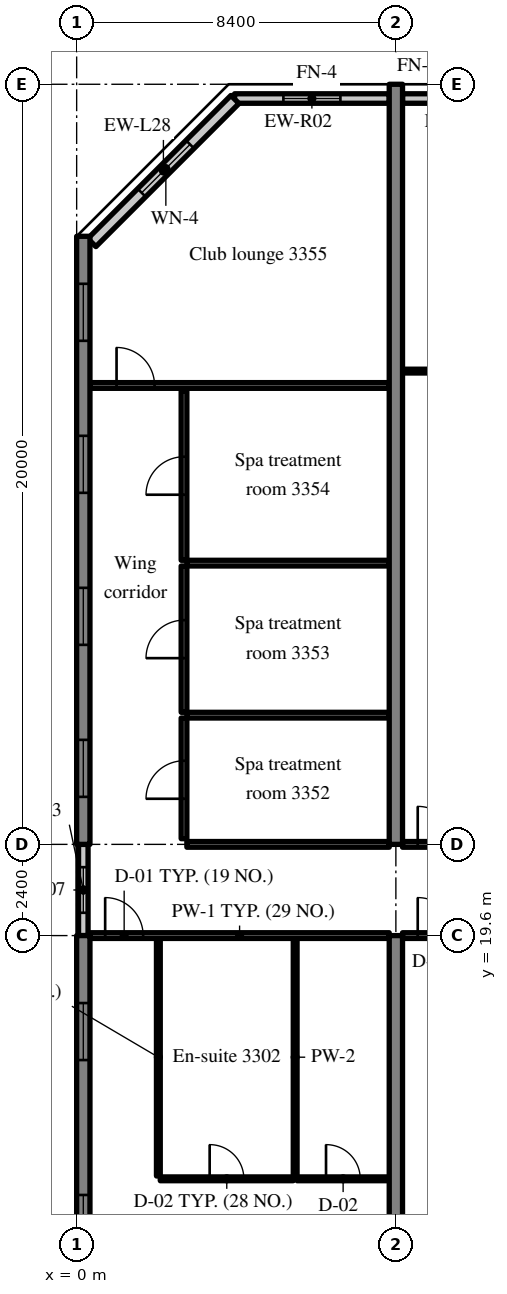
"""IFC4 building model, lengths in metres.
Left out: names, types, materials, properties, quantities, classifications, styles, units other than length and angle.
Written with IfcOpenShell. Run it as: python <this file> out.ifc"""

import sys

from ifc_helpers import new_model, si_unit, direction, frame, frame_2d, origin, place, context, subcontext, project, spatial, rectangle, extrude, source, transform, mapped, element, fill, save


model = new_model("IFC4")
c1 = context("Model", 3, precision=1e-05, world=origin(), true_north=direction((0.0, 1.0)))
c2 = subcontext(c1, "Body", "Model", "MODEL_VIEW")
j1 = project(units=[si_unit("LENGTHUNIT", "METRE"), si_unit("PLANEANGLEUNIT", "RADIAN")], contexts=[c1])
p1 = place(None, origin())
s1 = spatial("IfcSite", under=j1, at=p1, CompositionType="ELEMENT")
p2 = place(p1, origin())
s2 = spatial("IfcBuilding", under=s1, at=p2, CompositionType="ELEMENT")
p3 = place(p2, frame((0.0, 0.0, 137.0)))
s3 = spatial("IfcBuildingStorey", under=s2, at=p3, CompositionType="ELEMENT", Elevation=137.0)
m1 = source(origin(), c2, "Body", "SweptSolid", [
    extrude(rectangle(XDim=10.1, YDim=0.35, at=frame_2d((5.05, 0.0))), origin(), (0.0, 0.0, 1.0), 3.52),
])
p4 = place(p3, frame((0.175, 9.5, 0.0), z_axis=(0.0, 0.0, 1.0), x_axis=(0.0, 1.0, 0.0)))
e1 = element("IfcWall", 1, at=p4, inside=s3, PredefinedType="SHEAR", context=c2, shape_type="MappedRepresentation", body=[
    mapped(m1, transform((0.0, 0.0, 0.0), scale=1.0)),
])
m2 = source(origin(), c2, "Body", "SweptSolid", [
    extrude(rectangle(XDim=1.5, YDim=1.5, at=frame_2d((0.75, 0.75))), frame((0.0, 0.185, 0.0), z_axis=(0.0, -1.0, 0.0), x_axis=(1.0, 0.0, 0.0)), (0.0, 0.0, 1.0), 0.37),
])
p5 = place(p4, frame((1.775, 0.0, 0.9)))
e2 = element("IfcOpeningElement", 2, at=p5, cuts=e1, PredefinedType="OPENING", context=c2, shape_type="MappedRepresentation", body=[
    mapped(m2, transform((0.0, 0.0, 0.0), scale=1.0)),
])
p6 = place(p4, frame((6.825, 0.0, 0.9)))
e3 = element("IfcOpeningElement", 3, at=p6, cuts=e1, PredefinedType="OPENING", context=c2, shape_type="MappedRepresentation", body=[
    mapped(m2, transform((0.0, 0.0, 0.0), scale=1.0)),
])
m3 = source(origin(), c2, "Body", "SweptSolid", [
    extrude(rectangle(XDim=16.0, YDim=0.35, at=frame_2d((8.0, 0.0))), origin(), (0.0, 0.0, 1.0), 3.52),
])
p7 = place(p3, frame((0.175, 22.0, 0.0), z_axis=(0.0, 0.0, 1.0), x_axis=(0.0, 1.0, 0.0)))
e4 = element("IfcWall", 4, at=p7, inside=s3, PredefinedType="SHEAR", context=c2, shape_type="MappedRepresentation", body=[
    mapped(m3, transform((0.0, 0.0, 0.0), scale=1.0)),
])
p8 = place(p7, frame((1.25, 0.0, 0.9)))
e5 = element("IfcOpeningElement", 5, at=p8, cuts=e4, PredefinedType="OPENING", context=c2, shape_type="MappedRepresentation", body=[
    mapped(m2, transform((0.0, 0.0, 0.0), scale=1.0)),
])
p9 = place(p7, frame((5.25, 0.0, 0.9)))
e6 = element("IfcOpeningElement", 6, at=p9, cuts=e4, PredefinedType="OPENING", context=c2, shape_type="MappedRepresentation", body=[
    mapped(m2, transform((0.0, 0.0, 0.0), scale=1.0)),
])
p10 = place(p7, frame((9.25, 0.0, 0.9)))
e7 = element("IfcOpeningElement", 7, at=p10, cuts=e4, PredefinedType="OPENING", context=c2, shape_type="MappedRepresentation", body=[
    mapped(m2, transform((0.0, 0.0, 0.0), scale=1.0)),
])
p11 = place(p7, frame((13.25, 0.0, 0.9)))
e8 = element("IfcOpeningElement", 8, at=p11, cuts=e4, PredefinedType="OPENING", context=c2, shape_type="MappedRepresentation", body=[
    mapped(m2, transform((0.0, 0.0, 0.0), scale=1.0)),
])
m4 = source(origin(), c2, "Body", "SweptSolid", [
    extrude(rectangle(XDim=14.1, YDim=0.35, at=frame_2d((7.05, 0.0))), origin(), (0.0, 0.0, 1.0), 3.52),
])
p12 = place(p3, frame((8.4, 5.5, 0.0), z_axis=(0.0, 0.0, 1.0), x_axis=(0.0, 1.0, 0.0)))
e9 = element("IfcWall", 9, at=p12, inside=s3, PredefinedType="SHEAR", context=c2, shape_type="MappedRepresentation", body=[
    mapped(m4, transform((0.0, 0.0, 0.0), scale=1.0)),
])
m5 = source(origin(), c2, "Body", "SweptSolid", [
    extrude(rectangle(XDim=20.0, YDim=0.35, at=frame_2d((10.0, 0.0))), origin(), (0.0, 0.0, 1.0), 3.52),
])
p13 = place(p3, frame((8.4, 22.0, 0.0), z_axis=(0.0, 0.0, 1.0), x_axis=(0.0, 1.0, 0.0)))
e10 = element("IfcWall", 10, at=p13, inside=s3, PredefinedType="SHEAR", context=c2, shape_type="MappedRepresentation", body=[
    mapped(m5, transform((0.0, 0.0, 0.0), scale=1.0)),
])
m6 = source(origin(), c2, "Body", "SweptSolid", [
    extrude(rectangle(XDim=4.07, YDim=0.25, at=frame_2d((2.035, 0.0))), origin(), (0.0, 0.0, 1.0), 2.82),
])
p14 = place(p3, frame((8.225, 41.625, 0.0), z_axis=(0.0, 0.0, 1.0), x_axis=(-1.0, 0.0, 0.0)))
e11 = element("IfcWall", 11, at=p14, inside=s3, PredefinedType="SOLIDWALL", context=c2, shape_type="MappedRepresentation", body=[
    mapped(m6, transform((0.0, 0.0, 0.0), scale=1.0)),
])
m7 = source(origin(), c2, "Body", "SweptSolid", [
    extrude(rectangle(XDim=1.5, YDim=1.5, at=frame_2d((0.75, 0.75))), frame((0.0, 0.135, 0.0), z_axis=(0.0, -1.0, 0.0), x_axis=(1.0, 0.0, 0.0)), (0.0, 0.0, 1.0), 0.27),
])
p15 = place(p14, frame((1.285, 0.0, 0.9)))
e12 = element("IfcOpeningElement", 12, at=p15, cuts=e11, PredefinedType="OPENING", context=c2, shape_type="MappedRepresentation", body=[
    mapped(m7, transform((0.0, 0.0, 0.0), scale=1.0)),
])
m8 = source(origin(), c2, "Body", "SweptSolid", [
    extrude(rectangle(XDim=3.675, YDim=0.25, at=frame_2d((1.837, 0.0))), origin(), (0.0, 0.0, 1.0), 2.82),
])
p16 = place(p3, frame((12.25, 41.625, 0.0), z_axis=(0.0, 0.0, 1.0), x_axis=(-1.0, 0.0, 0.0)))
e13 = element("IfcWall", 13, at=p16, inside=s3, PredefinedType="SOLIDWALL", context=c2, shape_type="MappedRepresentation", body=[
    mapped(m8, transform((0.0, 0.0, 0.0), scale=1.0)),
])
p17 = place(p16, frame((1.087, 0.0, 0.9)))
e14 = element("IfcOpeningElement", 14, at=p17, cuts=e13, PredefinedType="OPENING", context=c2, shape_type="MappedRepresentation", body=[
    mapped(m7, transform((0.0, 0.0, 0.0), scale=1.0)),
])
m9 = source(origin(), c2, "Body", "SweptSolid", [
    extrude(rectangle(XDim=5.326, YDim=0.3, at=frame_2d((2.663, 0.0))), origin(), (0.0, 0.0, 1.0), 3.52),
])
p18 = place(p3, frame((4.166, 41.6, 0.0), z_axis=(0.0, 0.0, 1.0), x_axis=(-0.707106781187, -0.707106781187, 0.0)))
e15 = element("IfcWall", 15, at=p18, inside=s3, PredefinedType="SOLIDWALL", context=c2, shape_type="MappedRepresentation", body=[
    mapped(m9, transform((0.0, 0.0, 0.0), scale=1.0)),
])
m10 = source(origin(), c2, "Body", "SweptSolid", [
    extrude(rectangle(XDim=1.8, YDim=1.5, at=frame_2d((0.9, 0.75))), frame((0.0, 0.16, 0.0), z_axis=(0.0, -1.0, 0.0), x_axis=(1.0, 0.0, 0.0)), (0.0, 0.0, 1.0), 0.32),
])
p19 = place(p18, frame((1.672, 0.0, 0.9)))
e16 = element("IfcOpeningElement", 16, at=p19, cuts=e15, PredefinedType="OPENING", context=c2, shape_type="MappedRepresentation", body=[
    mapped(m10, transform((0.0, 0.0, 0.0), scale=1.0)),
])
m11 = source(origin(), c2, "Body", "SweptSolid", [
    extrude(rectangle(XDim=2.4, YDim=0.25, at=frame_2d((1.2, 0.0))), origin(), (0.0, 0.0, 1.0), 2.62),
])
p20 = place(p3, frame((0.175, 19.6, 0.0), z_axis=(0.0, 0.0, 1.0), x_axis=(0.0, 1.0, 0.0)))
e17 = element("IfcWall", 17, at=p20, inside=s3, PredefinedType="SOLIDWALL", context=c2, shape_type="MappedRepresentation", body=[
    mapped(m11, transform((0.0, 0.0, 0.0), scale=1.0)),
])
m12 = source(origin(), c2, "Body", "SweptSolid", [
    extrude(rectangle(XDim=1.2, YDim=1.5, at=frame_2d((0.6, 0.75))), frame((0.0, 0.135, 0.0), z_axis=(0.0, -1.0, 0.0), x_axis=(1.0, 0.0, 0.0)), (0.0, 0.0, 1.0), 0.27),
])
p21 = place(p20, frame((0.6, 0.0, 0.9)))
e18 = element("IfcOpeningElement", 18, at=p21, cuts=e17, PredefinedType="OPENING", context=c2, shape_type="MappedRepresentation", body=[
    mapped(m12, transform((0.0, 0.0, 0.0), scale=1.0)),
])
m13 = source(origin(), c2, "Body", "SweptSolid", [
    extrude(rectangle(XDim=6.25, YDim=0.1, at=frame_2d((3.125, 0.0))), origin(), (0.0, 0.0, 1.0), 3.52),
])
for number, where, z_axis, x_axis in (
    (19, (2.15, 13.275, 0.0), (0.0, 0.0, 1.0), (0.0, 1.0, 0.0)),
    (20, (5.75, 13.275, 0.0), (0.0, 0.0, 1.0), (0.0, 1.0, 0.0)),
):
    element("IfcWall", number, at=place(p3, frame(where, z_axis=z_axis, x_axis=x_axis)), inside=s3, PredefinedType="PARTITIONING", context=c2, shape_type="MappedRepresentation", body=[
        mapped(m13, transform((0.0, 0.0, 0.0), scale=1.0)),
    ])
m14 = source(origin(), c2, "Body", "SweptSolid", [
    extrude(rectangle(XDim=3.5, YDim=0.1, at=frame_2d((1.75, 0.0))), origin(), (0.0, 0.0, 1.0), 3.52),
])
p22 = place(p3, frame((2.2, 13.2, 0.0), z_axis=(0.0, 0.0, 1.0), x_axis=(1.0, 0.0, 0.0)))
e21 = element("IfcWall", 21, at=p22, inside=s3, PredefinedType="PARTITIONING", context=c2, shape_type="MappedRepresentation", body=[
    mapped(m14, transform((0.0, 0.0, 0.0), scale=1.0)),
])
m15 = source(origin(), c2, "Body", "SweptSolid", [
    extrude(rectangle(XDim=0.9, YDim=2.1, at=frame_2d((0.45, 1.05))), frame((0.0, 0.06, 0.0), z_axis=(0.0, -1.0, 0.0), x_axis=(1.0, 0.0, 0.0)), (0.0, 0.0, 1.0), 0.12),
])
p23 = place(p22, frame((1.3, 0.0, 0.0)))
e22 = element("IfcOpeningElement", 22, at=p23, cuts=e21, PredefinedType="OPENING", context=c2, shape_type="MappedRepresentation", body=[
    mapped(m15, transform((0.0, 0.0, 0.0), scale=1.0)),
])
m16 = source(origin(), c2, "Body", "SweptSolid", [
    extrude(rectangle(XDim=2.425, YDim=0.1, at=frame_2d((1.212, 0.0))), origin(), (0.0, 0.0, 1.0), 3.52),
])
p24 = place(p3, frame((5.8, 13.2, 0.0), z_axis=(0.0, 0.0, 1.0), x_axis=(1.0, 0.0, 0.0)))
e23 = element("IfcWall", 23, at=p24, inside=s3, PredefinedType="PARTITIONING", context=c2, shape_type="MappedRepresentation", body=[
    mapped(m16, transform((0.0, 0.0, 0.0), scale=1.0)),
])
p25 = place(p24, frame((0.762, 0.0, 0.0)))
e24 = element("IfcOpeningElement", 24, at=p25, cuts=e23, PredefinedType="OPENING", context=c2, shape_type="MappedRepresentation", body=[
    mapped(m15, transform((0.0, 0.0, 0.0), scale=1.0)),
])
m17 = source(origin(), c2, "Body", "SweptSolid", [
    extrude(rectangle(XDim=7.875, YDim=0.15, at=frame_2d((3.938, 0.0))), origin(), (0.0, 0.0, 1.0), 2.82),
])
p26 = place(p3, frame((0.35, 19.6, 0.0), z_axis=(0.0, 0.0, 1.0), x_axis=(1.0, 0.0, 0.0)))
e25 = element("IfcWall", 25, at=p26, inside=s3, PredefinedType="PARTITIONING", context=c2, shape_type="MappedRepresentation", body=[
    mapped(m17, transform((0.0, 0.0, 0.0), scale=1.0)),
])
m18 = source(origin(), c2, "Body", "SweptSolid", [
    extrude(rectangle(XDim=1.0, YDim=2.1, at=frame_2d((0.5, 1.05))), frame((0.0, 0.085, 0.0), z_axis=(0.0, -1.0, 0.0), x_axis=(1.0, 0.0, 0.0)), (0.0, 0.0, 1.0), 0.17),
])
p27 = place(p26, frame((0.4, 0.0, 0.0)))
e26 = element("IfcOpeningElement", 26, at=p27, cuts=e25, PredefinedType="OPENING", context=c2, shape_type="MappedRepresentation", body=[
    mapped(m18, transform((0.0, 0.0, 0.0), scale=1.0)),
])
m19 = source(origin(), c2, "Body", "SweptSolid", [
    extrude(rectangle(XDim=8.05, YDim=0.15, at=frame_2d((4.025, 0.0))), origin(), (0.0, 0.0, 1.0), 2.82),
])
p28 = place(p3, frame((8.575, 19.6, 0.0), z_axis=(0.0, 0.0, 1.0), x_axis=(1.0, 0.0, 0.0)))
e27 = element("IfcWall", 27, at=p28, inside=s3, PredefinedType="PARTITIONING", context=c2, shape_type="MappedRepresentation", body=[
    mapped(m19, transform((0.0, 0.0, 0.0), scale=1.0)),
])
p29 = place(p28, frame((0.4, 0.0, 0.0)))
e28 = element("IfcOpeningElement", 28, at=p29, cuts=e27, PredefinedType="OPENING", context=c2, shape_type="MappedRepresentation", body=[
    mapped(m18, transform((0.0, 0.0, 0.0), scale=1.0)),
])
m20 = source(origin(), c2, "Body", "SweptSolid", [
    extrude(rectangle(XDim=5.325, YDim=0.15, at=frame_2d((2.663, 0.0))), origin(), (0.0, 0.0, 1.0), 2.82),
])
p30 = place(p3, frame((2.9, 22.0, 0.0), z_axis=(0.0, 0.0, 1.0), x_axis=(1.0, 0.0, 0.0)))
e29 = element("IfcWall", 29, at=p30, inside=s3, PredefinedType="PARTITIONING", context=c2, shape_type="MappedRepresentation", body=[
    mapped(m20, transform((0.0, 0.0, 0.0), scale=1.0)),
])
m21 = source(origin(), c2, "Body", "SweptSolid", [
    extrude(rectangle(XDim=3.175, YDim=0.15, at=frame_2d((1.587, 0.0))), origin(), (0.0, 0.0, 1.0), 3.52),
])
p31 = place(p3, frame((2.825, 22.15, 0.0), z_axis=(0.0, 0.0, 1.0), x_axis=(0.0, 1.0, 0.0)))
e30 = element("IfcWall", 30, at=p31, inside=s3, PredefinedType="PARTITIONING", context=c2, shape_type="MappedRepresentation", body=[
    mapped(m21, transform((0.0, 0.0, 0.0), scale=1.0)),
])
p32 = place(p31, frame((1.05, 0.0, 0.0)))
e31 = element("IfcOpeningElement", 31, at=p32, cuts=e30, PredefinedType="OPENING", context=c2, shape_type="MappedRepresentation", body=[
    mapped(m18, transform((0.0, 0.0, 0.0), scale=1.0)),
])
m22 = source(origin(), c2, "Body", "SweptSolid", [
    extrude(rectangle(XDim=5.325, YDim=0.15, at=frame_2d((2.663, 0.0))), origin(), (0.0, 0.0, 1.0), 3.52),
])
p33 = place(p3, frame((2.9, 25.4, 0.0), z_axis=(0.0, 0.0, 1.0), x_axis=(1.0, 0.0, 0.0)))
e32 = element("IfcWall", 32, at=p33, inside=s3, PredefinedType="PARTITIONING", context=c2, shape_type="MappedRepresentation", body=[
    mapped(m22, transform((0.0, 0.0, 0.0), scale=1.0)),
])
m23 = source(origin(), c2, "Body", "SweptSolid", [
    extrude(rectangle(XDim=3.85, YDim=0.15, at=frame_2d((1.925, 0.0))), origin(), (0.0, 0.0, 1.0), 3.52),
])
p34 = place(p3, frame((2.825, 25.475, 0.0), z_axis=(0.0, 0.0, 1.0), x_axis=(0.0, 1.0, 0.0)))
e33 = element("IfcWall", 33, at=p34, inside=s3, PredefinedType="PARTITIONING", context=c2, shape_type="MappedRepresentation", body=[
    mapped(m23, transform((0.0, 0.0, 0.0), scale=1.0)),
])
p35 = place(p34, frame((1.425, 0.0, 0.0)))
e34 = element("IfcOpeningElement", 34, at=p35, cuts=e33, PredefinedType="OPENING", context=c2, shape_type="MappedRepresentation", body=[
    mapped(m18, transform((0.0, 0.0, 0.0), scale=1.0)),
])
p36 = place(p3, frame((2.9, 29.4, 0.0), z_axis=(0.0, 0.0, 1.0), x_axis=(1.0, 0.0, 0.0)))
e35 = element("IfcWall", 35, at=p36, inside=s3, PredefinedType="PARTITIONING", context=c2, shape_type="MappedRepresentation", body=[
    mapped(m22, transform((0.0, 0.0, 0.0), scale=1.0)),
])
m24 = source(origin(), c2, "Body", "SweptSolid", [
    extrude(rectangle(XDim=4.45, YDim=0.15, at=frame_2d((2.225, 0.0))), origin(), (0.0, 0.0, 1.0), 3.52),
])
p37 = place(p3, frame((2.825, 29.475, 0.0), z_axis=(0.0, 0.0, 1.0), x_axis=(0.0, 1.0, 0.0)))
e36 = element("IfcWall", 36, at=p37, inside=s3, PredefinedType="PARTITIONING", context=c2, shape_type="MappedRepresentation", body=[
    mapped(m24, transform((0.0, 0.0, 0.0), scale=1.0)),
])
p38 = place(p37, frame((1.725, 0.0, 0.0)))
e37 = element("IfcOpeningElement", 37, at=p38, cuts=e36, PredefinedType="OPENING", context=c2, shape_type="MappedRepresentation", body=[
    mapped(m18, transform((0.0, 0.0, 0.0), scale=1.0)),
])
m25 = source(origin(), c2, "Body", "SweptSolid", [
    extrude(rectangle(XDim=7.875, YDim=0.15, at=frame_2d((3.938, 0.0))), origin(), (0.0, 0.0, 1.0), 3.52),
])
p39 = place(p3, frame((0.35, 34.075, 0.0), z_axis=(0.0, 0.0, 1.0), x_axis=(1.0, 0.0, 0.0)))
e38 = element("IfcWall", 38, at=p39, inside=s3, PredefinedType="PARTITIONING", context=c2, shape_type="MappedRepresentation", body=[
    mapped(m25, transform((0.0, 0.0, 0.0), scale=1.0)),
])
p40 = place(p39, frame((0.7, 0.0, 0.0)))
e39 = element("IfcOpeningElement", 39, at=p40, cuts=e38, PredefinedType="OPENING", context=c2, shape_type="MappedRepresentation", body=[
    mapped(m18, transform((0.0, 0.0, 0.0), scale=1.0)),
])
m26 = source(origin(), c2, "Body", "SweptSolid", [
    extrude(rectangle(XDim=8.05, YDim=0.1, at=frame_2d((4.025, 0.0))), origin(), (0.0, 0.0, 1.0), 3.52),
])
p41 = place(p3, frame((8.575, 34.453, 0.0), z_axis=(0.0, 0.0, 1.0), x_axis=(1.0, 0.0, 0.0)))
e40 = element("IfcWall", 40, at=p41, inside=s3, PredefinedType="PARTITIONING", context=c2, shape_type="MappedRepresentation", body=[
    mapped(m26, transform((0.0, 0.0, 0.0), scale=1.0)),
])
m27 = source(origin(), c2, "Body", "SweptSolid", [
    extrude(rectangle(XDim=1.8, YDim=2.1, at=frame_2d((0.9, 1.05))), frame((0.0, 0.06, 0.0), z_axis=(0.0, -1.0, 0.0), x_axis=(1.0, 0.0, 0.0)), (0.0, 0.0, 1.0), 0.12),
])
p42 = place(p41, frame((3.125, 0.0, 0.0)))
e41 = element("IfcOpeningElement", 41, at=p42, cuts=e40, PredefinedType="OPENING", context=c2, shape_type="MappedRepresentation", body=[
    mapped(m27, transform((0.0, 0.0, 0.0), scale=1.0)),
])
p43 = place(p3, frame((8.575, 22.0, 0.0), z_axis=(0.0, 0.0, 1.0), x_axis=(1.0, 0.0, 0.0)))
e42 = element("IfcWall", 42, at=p43, inside=s3, PredefinedType="PARTITIONING", context=c2, shape_type="MappedRepresentation", body=[
    mapped(m19, transform((0.0, 0.0, 0.0), scale=1.0)),
])
p44 = place(p43, frame((0.4, 0.0, 0.0)))
e43 = element("IfcOpeningElement", 43, at=p44, cuts=e42, PredefinedType="OPENING", context=c2, shape_type="MappedRepresentation", body=[
    mapped(m18, transform((0.0, 0.0, 0.0), scale=1.0)),
])
m28 = source(origin(), c2, "Body", "SweptSolid", [
    extrude(rectangle(XDim=1.5, YDim=1.5, at=frame_2d((0.75, 0.75))), frame((0.0, 0.03, 0.0), z_axis=(0.0, -1.0, 0.0), x_axis=(1.0, 0.0, 0.0)), (0.0, 0.0, 1.0), 0.06),
])
p45 = place(p15, origin())
e44 = element("IfcWindow", 44, at=p45, inside=s3, PartitioningType="SINGLE_PANEL", PredefinedType="WINDOW", context=c2, shape_type="MappedRepresentation", body=[
    mapped(m28, transform((0.0, 0.0, 0.0), scale=1.0)),
])
fill(e12, e44)
m29 = source(origin(), c2, "Body", "SweptSolid", [
    extrude(rectangle(XDim=1.8, YDim=1.5, at=frame_2d((0.9, 0.75))), frame((0.0, 0.03, 0.0), z_axis=(0.0, -1.0, 0.0), x_axis=(1.0, 0.0, 0.0)), (0.0, 0.0, 1.0), 0.06),
])
p46 = place(p19, origin())
e45 = element("IfcWindow", 45, at=p46, inside=s3, PartitioningType="SINGLE_PANEL", PredefinedType="WINDOW", context=c2, shape_type="MappedRepresentation", body=[
    mapped(m29, transform((0.0, 0.0, 0.0), scale=1.0)),
])
fill(e16, e45)
p47 = place(p5, origin())
e46 = element("IfcWindow", 46, at=p47, inside=s3, PartitioningType="SINGLE_PANEL", PredefinedType="WINDOW", context=c2, shape_type="MappedRepresentation", body=[
    mapped(m28, transform((0.0, 0.0, 0.0), scale=1.0)),
])
fill(e2, e46)
p48 = place(p6, origin())
e47 = element("IfcWindow", 47, at=p48, inside=s3, PartitioningType="SINGLE_PANEL", PredefinedType="WINDOW", context=c2, shape_type="MappedRepresentation", body=[
    mapped(m28, transform((0.0, 0.0, 0.0), scale=1.0)),
])
fill(e3, e47)
p49 = place(p8, origin())
e48 = element("IfcWindow", 48, at=p49, inside=s3, PartitioningType="SINGLE_PANEL", PredefinedType="WINDOW", context=c2, shape_type="MappedRepresentation", body=[
    mapped(m28, transform((0.0, 0.0, 0.0), scale=1.0)),
])
fill(e5, e48)
p50 = place(p9, origin())
e49 = element("IfcWindow", 49, at=p50, inside=s3, PartitioningType="SINGLE_PANEL", PredefinedType="WINDOW", context=c2, shape_type="MappedRepresentation", body=[
    mapped(m28, transform((0.0, 0.0, 0.0), scale=1.0)),
])
fill(e6, e49)
p51 = place(p10, origin())
e50 = element("IfcWindow", 50, at=p51, inside=s3, PartitioningType="SINGLE_PANEL", PredefinedType="WINDOW", context=c2, shape_type="MappedRepresentation", body=[
    mapped(m28, transform((0.0, 0.0, 0.0), scale=1.0)),
])
fill(e7, e50)
p52 = place(p11, origin())
e51 = element("IfcWindow", 51, at=p52, inside=s3, PartitioningType="SINGLE_PANEL", PredefinedType="WINDOW", context=c2, shape_type="MappedRepresentation", body=[
    mapped(m28, transform((0.0, 0.0, 0.0), scale=1.0)),
])
fill(e8, e51)
m30 = source(origin(), c2, "Body", "SweptSolid", [
    extrude(rectangle(XDim=1.2, YDim=1.5, at=frame_2d((0.6, 0.75))), frame((0.0, 0.03, 0.0), z_axis=(0.0, -1.0, 0.0), x_axis=(1.0, 0.0, 0.0)), (0.0, 0.0, 1.0), 0.06),
])
p53 = place(p21, origin())
e52 = element("IfcWindow", 52, at=p53, inside=s3, PartitioningType="SINGLE_PANEL", PredefinedType="WINDOW", context=c2, shape_type="MappedRepresentation", body=[
    mapped(m30, transform((0.0, 0.0, 0.0), scale=1.0)),
])
fill(e18, e52)
m31 = source(origin(), c2, "Body", "SweptSolid", [
    extrude(rectangle(XDim=0.9, YDim=2.1, at=frame_2d((0.45, 1.05))), frame((0.0, 0.025, 0.0), z_axis=(0.0, -1.0, 0.0), x_axis=(1.0, 0.0, 0.0)), (0.0, 0.0, 1.0), 0.05),
])
p54 = place(p23, origin())
e53 = element("IfcDoor", 53, at=p54, inside=s3, OperationType="SINGLE_SWING_LEFT", PredefinedType="DOOR", context=c2, shape_type="MappedRepresentation", body=[
    mapped(m31, transform((0.0, 0.0, 0.0), scale=1.0)),
])
fill(e22, e53)
p55 = place(p25, origin())
e54 = element("IfcDoor", 54, at=p55, inside=s3, OperationType="SINGLE_SWING_LEFT", PredefinedType="DOOR", context=c2, shape_type="MappedRepresentation", body=[
    mapped(m31, transform((0.0, 0.0, 0.0), scale=1.0)),
])
fill(e24, e54)
m32 = source(origin(), c2, "Body", "SweptSolid", [
    extrude(rectangle(XDim=1.0, YDim=2.1, at=frame_2d((0.5, 1.05))), frame((0.0, 0.025, 0.0), z_axis=(0.0, -1.0, 0.0), x_axis=(1.0, 0.0, 0.0)), (0.0, 0.0, 1.0), 0.05),
])
p56 = place(p27, origin())
e55 = element("IfcDoor", 55, at=p56, inside=s3, OperationType="SINGLE_SWING_LEFT", PredefinedType="DOOR", context=c2, shape_type="MappedRepresentation", body=[
    mapped(m32, transform((0.0, 0.0, 0.0), scale=1.0)),
])
fill(e26, e55)
p57 = place(p29, origin())
e56 = element("IfcDoor", 56, at=p57, inside=s3, OperationType="SINGLE_SWING_LEFT", PredefinedType="DOOR", context=c2, shape_type="MappedRepresentation", body=[
    mapped(m32, transform((0.0, 0.0, 0.0), scale=1.0)),
])
fill(e28, e56)
p58 = place(p32, origin())
e57 = element("IfcDoor", 57, at=p58, inside=s3, OperationType="SINGLE_SWING_LEFT", PredefinedType="DOOR", context=c2, shape_type="MappedRepresentation", body=[
    mapped(m32, transform((0.0, 0.0, 0.0), scale=1.0)),
])
fill(e31, e57)
p59 = place(p35, origin())
e58 = element("IfcDoor", 58, at=p59, inside=s3, OperationType="SINGLE_SWING_LEFT", PredefinedType="DOOR", context=c2, shape_type="MappedRepresentation", body=[
    mapped(m32, transform((0.0, 0.0, 0.0), scale=1.0)),
])
fill(e34, e58)
p60 = place(p38, origin())
e59 = element("IfcDoor", 59, at=p60, inside=s3, OperationType="SINGLE_SWING_LEFT", PredefinedType="DOOR", context=c2, shape_type="MappedRepresentation", body=[
    mapped(m32, transform((0.0, 0.0, 0.0), scale=1.0)),
])
fill(e37, e59)
p61 = place(p40, origin())
e60 = element("IfcDoor", 60, at=p61, inside=s3, OperationType="SINGLE_SWING_LEFT", PredefinedType="DOOR", context=c2, shape_type="MappedRepresentation", body=[
    mapped(m32, transform((0.0, 0.0, 0.0), scale=1.0)),
])
fill(e39, e60)
p62 = place(p44, origin())
e61 = element("IfcDoor", 61, at=p62, inside=s3, OperationType="SINGLE_SWING_LEFT", PredefinedType="DOOR", context=c2, shape_type="MappedRepresentation", body=[
    mapped(m32, transform((0.0, 0.0, 0.0), scale=1.0)),
])
fill(e43, e61)
save(model, sys.argv[1])
